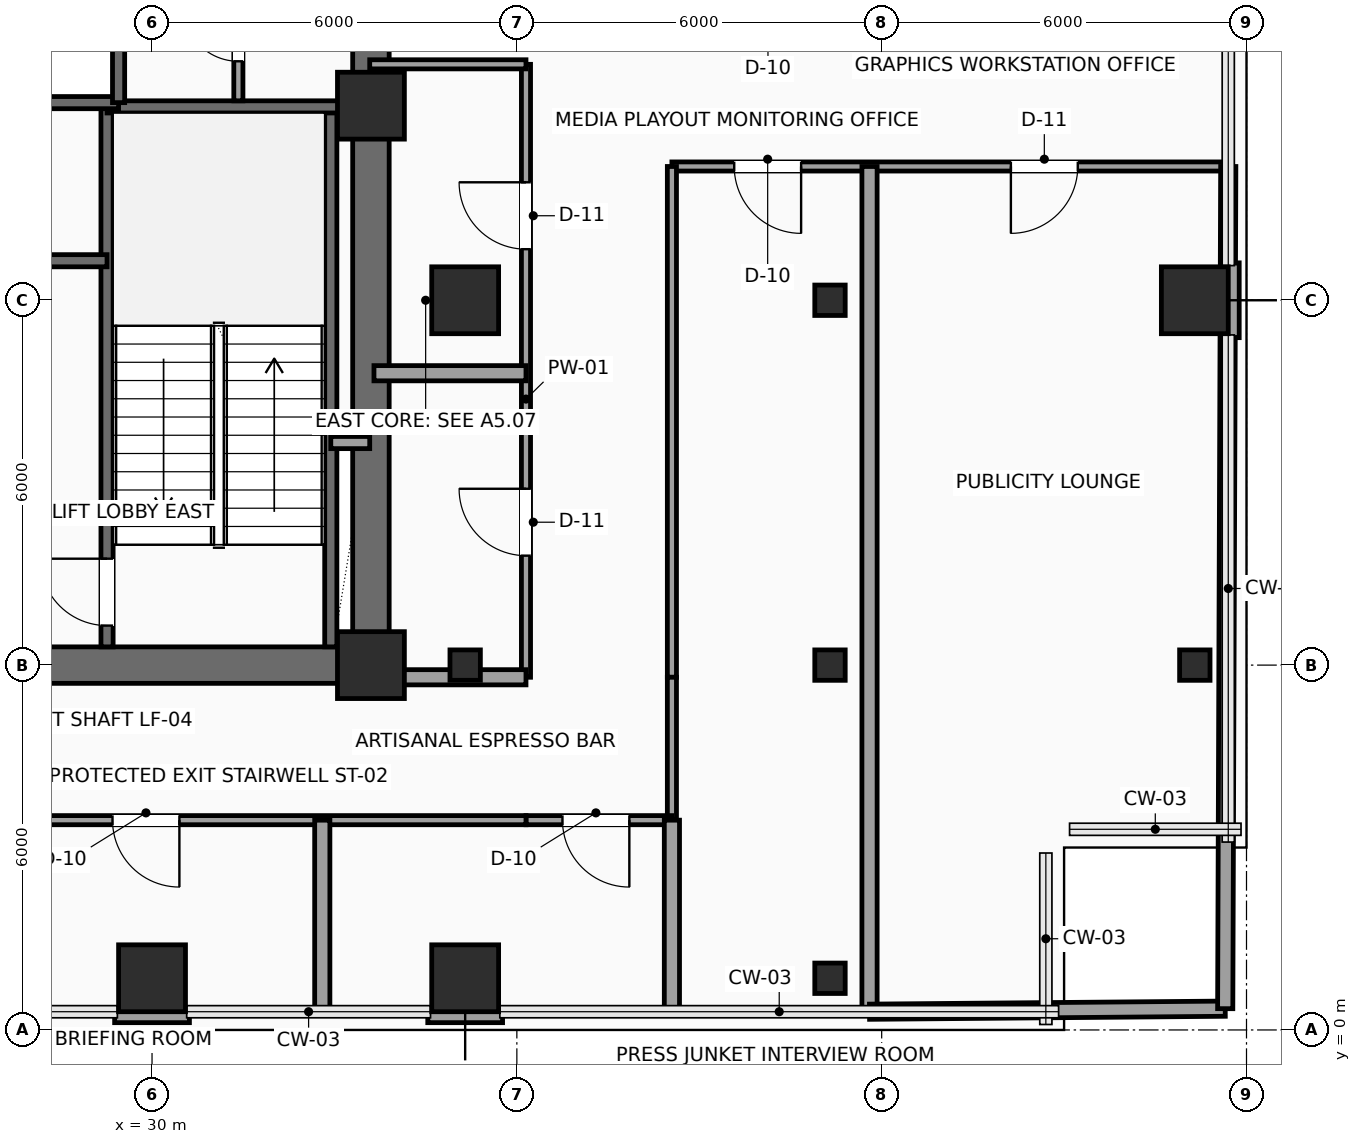
"""IFC4 building model, lengths in metres.
Left out: names, types, materials, properties, quantities, classifications, styles, units other than length and angle.
Written with IfcOpenShell. Run it as: python <this file> out.ifc"""

import sys

from ifc_helpers import new_model, si_unit, direction, frame, frame_2d, origin, origin_2d, place, context, subcontext, project, spatial, rectangle, hollow_rectangle, extrude, element, fill, save


model = new_model("IFC4")
c1 = context("Model", 3, precision=1e-05, world=origin(), true_north=direction((0.0, 1.0)))
c2 = subcontext(c1, "Body", "Model", "MODEL_VIEW")
j1 = project(units=[si_unit("LENGTHUNIT", "METRE"), si_unit("PLANEANGLEUNIT", "RADIAN")], contexts=[c1])
p1 = place(None, origin())
s1 = spatial("IfcSite", under=j1, at=p1, CompositionType="ELEMENT")
p2 = place(p1, origin())
s2 = spatial("IfcBuilding", under=s1, at=p2, CompositionType="ELEMENT")
p3 = place(p2, frame((0.0, 0.0, 130.65)))
s3 = spatial("IfcBuildingStorey", under=s2, at=p3, CompositionType="ELEMENT", Elevation=130.65)
for number, where, z_axis, x_axis in (
    (1, (33.6, 6.0, 0.0), (0.0, 0.0, 1.0), (1.0, 0.0, 0.0)),
    (2, (33.6, 15.2, 0.0), (0.0, 0.0, 1.0), (1.0, 0.0, 0.0)),
    (3, (30.0, 0.85, 0.0), (0.0, 0.0, 1.0), (1.0, 0.0, 0.0)),
    (4, (35.15, 0.85, 0.0), (0.0, 0.0, 1.0), (1.0, 0.0, 0.0)),
):
    element("IfcColumn", number, at=place(p3, frame(where, z_axis=z_axis, x_axis=x_axis)), inside=s3, PredefinedType="COLUMN", context=c2, shape_type="SweptSolid", body=[
        extrude(rectangle(XDim=1.1, YDim=1.1, at=origin_2d()), origin(), (0.0, 0.0, 1.0), 3.75),
    ])
p4 = place(p3, frame((35.15, 6.0, 0.0), z_axis=(0.0, 0.0, 1.0), x_axis=(1.0, 0.0, 0.0)))
e5 = element("IfcColumn", 5, at=p4, inside=s3, PredefinedType="COLUMN", context=c2, shape_type="SweptSolid", body=[
    extrude(hollow_rectangle(XDim=0.5, YDim=0.5, WallThickness=0.025, InnerFilletRadius=0.025, OuterFilletRadius=0.04, at=origin_2d()), origin(), (0.0, 0.0, 1.0), 3.75),
])
p5 = place(p3, frame((35.15, 12.0, 0.0), z_axis=(0.0, 0.0, 1.0), x_axis=(1.0, 0.0, 0.0)))
e6 = element("IfcColumn", 6, at=p5, inside=s3, PredefinedType="COLUMN", context=c2, shape_type="SweptSolid", body=[
    extrude(rectangle(XDim=1.1, YDim=1.1, at=origin_2d()), origin(), (0.0, 0.0, 1.0), 3.75),
])
for number, where, z_axis, x_axis in (
    (7, (41.15, 0.85, 0.0), (0.0, 0.0, 1.0), (1.0, 0.0, 0.0)),
    (8, (41.15, 6.0, 0.0), (0.0, 0.0, 1.0), (1.0, 0.0, 0.0)),
    (9, (41.15, 12.0, 0.0), (0.0, 0.0, 1.0), (1.0, 0.0, 0.0)),
    (10, (47.15, 6.0, 0.0), (0.0, 0.0, 1.0), (1.0, 0.0, 0.0)),
):
    element("IfcColumn", number, at=place(p3, frame(where, z_axis=z_axis, x_axis=x_axis)), inside=s3, PredefinedType="COLUMN", context=c2, shape_type="SweptSolid", body=[
        extrude(hollow_rectangle(XDim=0.5, YDim=0.5, WallThickness=0.025, InnerFilletRadius=0.025, OuterFilletRadius=0.04, at=origin_2d()), origin(), (0.0, 0.0, 1.0), 3.75),
    ])
p6 = place(p3, frame((47.15, 12.0, 0.0), z_axis=(0.0, 0.0, 1.0), x_axis=(1.0, 0.0, 0.0)))
e11 = element("IfcColumn", 11, at=p6, inside=s3, PredefinedType="COLUMN", context=c2, shape_type="SweptSolid", body=[
    extrude(rectangle(XDim=1.1, YDim=1.1, at=origin_2d()), origin(), (0.0, 0.0, 1.0), 3.75),
])
for number, where, z_axis, x_axis in (
    (12, (47.76, 12.615, 0.0), (0.0, 0.0, 1.0), (0.0, -1.0, 0.0)),
    (13, (35.765, 0.24, 0.0), (0.0, 0.0, 1.0), (-1.0, 0.0, 0.0)),
    (14, (30.615, 0.24, 0.0), (0.0, 0.0, 1.0), (-1.0, 0.0, 0.0)),
):
    element("IfcWall", number, at=place(p3, frame(where, z_axis=z_axis, x_axis=x_axis)), inside=s3, PredefinedType="SOLIDWALL", context=c2, shape_type="SweptSolid", body=[
        extrude(rectangle(XDim=1.23, YDim=0.24, at=frame_2d((0.615, 0.0))), origin(), (0.0, 0.0, 1.0), 3.525),
    ])
p7 = place(p3, frame((24.0, 6.0, 0.0), z_axis=(0.0, 0.0, 1.0), x_axis=(1.0, 0.0, 0.0)))
e15 = element("IfcWall", 15, at=p7, inside=s3, PredefinedType="SHEAR", context=c2, shape_type="SweptSolid", body=[
    extrude(rectangle(XDim=9.6, YDim=0.6, at=frame_2d((4.8, 0.0))), origin(), (0.0, 0.0, 1.0), 3.525),
])
p8 = place(p3, frame((33.6, 6.0, 0.0), z_axis=(0.0, 0.0, 1.0), x_axis=(0.0, 1.0, 0.0)))
e16 = element("IfcWall", 16, at=p8, inside=s3, PredefinedType="SHEAR", context=c2, shape_type="SweptSolid", body=[
    extrude(rectangle(XDim=12.0, YDim=0.6, at=frame_2d((6.0, 0.0))), origin(), (0.0, 0.0, 1.0), 3.525),
])
p9 = place(p8, frame((10.2, 0.0, 0.0)))
e17 = element("IfcOpeningElement", 17, at=p9, cuts=e16, PredefinedType="OPENING", context=c2, shape_type="SweptSolid", body=[
    extrude(rectangle(XDim=0.9, YDim=2.15, at=frame_2d((0.45, 1.075))), frame((0.0, 0.31, 0.0), z_axis=(0.0, -1.0, 0.0), x_axis=(1.0, 0.0, 0.0)), (0.0, 0.0, 1.0), 0.62),
])
p10 = place(p3, frame((29.26, 6.3, 0.0), z_axis=(0.0, 0.0, 1.0), x_axis=(0.0, 1.0, 0.0)))
e18 = element("IfcWall", 18, at=p10, inside=s3, PredefinedType="SHEAR", context=c2, shape_type="SweptSolid", body=[
    extrude(rectangle(XDim=8.88, YDim=0.2, at=frame_2d((4.44, 0.0))), origin(), (0.0, 0.0, 1.0), 3.525),
])
p11 = place(p10, frame((0.35, 0.0, 0.0)))
e19 = element("IfcOpeningElement", 19, at=p11, cuts=e18, PredefinedType="OPENING", context=c2, shape_type="SweptSolid", body=[
    extrude(rectangle(XDim=1.1, YDim=2.2, at=frame_2d((0.55, 1.1))), frame((0.0, 0.11, 0.0), z_axis=(0.0, -1.0, 0.0), x_axis=(1.0, 0.0, 0.0)), (0.0, 0.0, 1.0), 0.22),
])
p12 = place(p3, frame((32.94, 6.3, 0.0), z_axis=(0.0, 0.0, 1.0), x_axis=(0.0, 1.0, 0.0)))
e20 = element("IfcWall", 20, at=p12, inside=s3, PredefinedType="SHEAR", context=c2, shape_type="SweptSolid", body=[
    extrude(rectangle(XDim=8.88, YDim=0.2, at=frame_2d((4.44, 0.0))), origin(), (0.0, 0.0, 1.0), 3.525),
])
p13 = place(p3, frame((29.26, 15.18, 0.0), z_axis=(0.0, 0.0, 1.0), x_axis=(1.0, 0.0, 0.0)))
e21 = element("IfcWall", 21, at=p13, inside=s3, PredefinedType="SHEAR", context=c2, shape_type="SweptSolid", body=[
    extrude(rectangle(XDim=4.04, YDim=0.2, at=frame_2d((2.02, 0.0))), origin(), (0.0, 0.0, 1.0), 3.525),
])
p14 = place(p3, frame((26.42, 12.65, 0.0), z_axis=(0.0, 0.0, 1.0), x_axis=(1.0, 0.0, 0.0)))
e22 = element("IfcWall", 22, at=p14, inside=s3, PredefinedType="SHEAR", context=c2, shape_type="SweptSolid", body=[
    extrude(rectangle(XDim=2.84, YDim=0.2, at=frame_2d((1.42, 0.0))), origin(), (0.0, 0.0, 1.0), 3.525),
])
p15 = place(p14, frame((0.9, 0.0, 0.0)))
e23 = element("IfcOpeningElement", 23, at=p15, cuts=e22, PredefinedType="OPENING", context=c2, shape_type="SweptSolid", body=[
    extrude(rectangle(XDim=0.9, YDim=2.15, at=frame_2d((0.45, 1.075))), frame((0.0, 0.11, 0.0), z_axis=(0.0, -1.0, 0.0), x_axis=(1.0, 0.0, 0.0)), (0.0, 0.0, 1.0), 0.22),
])
p16 = place(p3, frame((32.94, 9.66, 0.0), z_axis=(0.0, 0.0, 1.0), x_axis=(1.0, 0.0, 0.0)))
e24 = element("IfcWall", 24, at=p16, inside=s3, PredefinedType="SOLIDWALL", context=c2, shape_type="SweptSolid", body=[
    extrude(rectangle(XDim=0.64, YDim=0.2, at=frame_2d((0.32, 0.0))), origin(), (0.0, 0.0, 1.0), 3.525),
])
p17 = place(p3, frame((24.25, 15.25, 0.0), z_axis=(0.0, 0.0, 1.0), x_axis=(1.0, 0.0, 0.0)))
e25 = element("IfcWall", 25, at=p17, inside=s3, PredefinedType="SHEAR", context=c2, shape_type="SweptSolid", body=[
    extrude(rectangle(XDim=5.2, YDim=0.2, at=frame_2d((2.6, 0.0))), origin(), (0.0, 0.0, 1.0), 3.525),
])
p18 = place(p3, frame((29.45, 15.25, 0.0), z_axis=(0.0, 0.0, 1.0), x_axis=(0.0, 1.0, 0.0)))
e26 = element("IfcWall", 26, at=p18, inside=s3, PredefinedType="SHEAR", context=c2, shape_type="SweptSolid", body=[
    extrude(rectangle(XDim=2.45, YDim=0.2, at=frame_2d((1.225, 0.0))), origin(), (0.0, 0.0, 1.0), 3.525),
])
p19 = place(p3, frame((31.42, 15.28, 0.0), z_axis=(0.0, 0.0, 1.0), x_axis=(0.0, 1.0, 0.0)))
e27 = element("IfcWall", 27, at=p19, inside=s3, PredefinedType="PARTITIONING", context=c2, shape_type="SweptSolid", body=[
    extrude(rectangle(XDim=2.42, YDim=0.15, at=frame_2d((1.21, 0.0))), origin(), (0.0, 0.0, 1.0), 3.525),
])
p20 = place(p19, frame((0.65, 0.0, 0.0)))
e28 = element("IfcOpeningElement", 28, at=p20, cuts=e27, PredefinedType="OPENING", context=c2, shape_type="SweptSolid", body=[
    extrude(rectangle(XDim=0.9, YDim=2.15, at=frame_2d((0.45, 1.075))), frame((0.0, 0.085, 0.0), z_axis=(0.0, -1.0, 0.0), x_axis=(1.0, 0.0, 0.0)), (0.0, 0.0, 1.0), 0.17),
])
p21 = place(p3, frame((36.15, 5.8, 0.0), z_axis=(0.0, 0.0, 1.0), x_axis=(0.0, 1.0, 0.0)))
e29 = element("IfcWall", 29, at=p21, inside=s3, PredefinedType="PARTITIONING", context=c2, shape_type="SweptSolid", body=[
    extrude(rectangle(XDim=10.08, YDim=0.15, at=frame_2d((5.04, 0.0))), origin(), (0.0, 0.0, 1.0), 3.525),
])
p22 = place(p21, frame((2.0, 0.0, 0.0)))
e30 = element("IfcOpeningElement", 30, at=p22, cuts=e29, PredefinedType="OPENING", context=c2, shape_type="SweptSolid", body=[
    extrude(rectangle(XDim=1.1, YDim=2.25, at=frame_2d((0.55, 1.125))), frame((0.0, 0.085, 0.0), z_axis=(0.0, -1.0, 0.0), x_axis=(1.0, 0.0, 0.0)), (0.0, 0.0, 1.0), 0.17),
])
p23 = place(p21, frame((7.04, 0.0, 0.0)))
e31 = element("IfcOpeningElement", 31, at=p23, cuts=e29, PredefinedType="OPENING", context=c2, shape_type="SweptSolid", body=[
    extrude(rectangle(XDim=1.1, YDim=2.25, at=frame_2d((0.55, 1.125))), frame((0.0, 0.085, 0.0), z_axis=(0.0, -1.0, 0.0), x_axis=(1.0, 0.0, 0.0)), (0.0, 0.0, 1.0), 0.17),
])
p24 = place(p3, frame((36.15, 15.88, 0.0), z_axis=(0.0, 0.0, 1.0), x_axis=(-1.0, 0.0, 0.0)))
e32 = element("IfcWall", 32, at=p24, inside=s3, PredefinedType="PARTITIONING", context=c2, shape_type="SweptSolid", body=[
    extrude(rectangle(XDim=2.57, YDim=0.15, at=frame_2d((1.285, 0.0))), origin(), (0.0, 0.0, 1.0), 3.525),
])
p25 = place(p3, frame((47.7, 14.2, 0.0), z_axis=(0.0, 0.0, 1.0), x_axis=(-1.0, 0.0, 0.0)))
e33 = element("IfcWall", 33, at=p25, inside=s3, PredefinedType="PARTITIONING", context=c2, shape_type="SweptSolid", body=[
    extrude(rectangle(XDim=9.15, YDim=0.15, at=frame_2d((4.575, 0.0))), origin(), (0.0, 0.0, 1.0), 3.525),
])
p26 = place(p25, frame((7.025, 0.0, 0.0)))
e34 = element("IfcOpeningElement", 34, at=p26, cuts=e33, PredefinedType="OPENING", context=c2, shape_type="SweptSolid", body=[
    extrude(rectangle(XDim=1.1, YDim=2.25, at=frame_2d((0.55, 1.125))), frame((0.0, 0.085, 0.0), z_axis=(0.0, -1.0, 0.0), x_axis=(1.0, 0.0, 0.0)), (0.0, 0.0, 1.0), 0.17),
])
p27 = place(p25, frame((2.475, 0.0, 0.0)))
e35 = element("IfcOpeningElement", 35, at=p27, cuts=e33, PredefinedType="OPENING", context=c2, shape_type="SweptSolid", body=[
    extrude(rectangle(XDim=1.1, YDim=2.25, at=frame_2d((0.55, 1.125))), frame((0.0, 0.085, 0.0), z_axis=(0.0, -1.0, 0.0), x_axis=(1.0, 0.0, 0.0)), (0.0, 0.0, 1.0), 0.17),
])
p28 = place(p3, frame((38.55, 14.2, 0.0), z_axis=(0.0, 0.0, 1.0), x_axis=(0.0, -1.0, 0.0)))
e36 = element("IfcWall", 36, at=p28, inside=s3, PredefinedType="PARTITIONING", context=c2, shape_type="SweptSolid", body=[
    extrude(rectangle(XDim=8.4, YDim=0.15, at=frame_2d((4.2, 0.0))), origin(), (0.0, 0.0, 1.0), 3.525),
])
p29 = place(p3, frame((38.55, 5.8, 0.0), z_axis=(0.0, 0.0, 1.0), x_axis=(0.0, -1.0, 0.0)))
e37 = element("IfcWall", 37, at=p29, inside=s3, PredefinedType="PARTITIONING", context=c2, shape_type="SweptSolid", body=[
    extrude(rectangle(XDim=2.35, YDim=0.15, at=frame_2d((1.175, 0.0))), origin(), (0.0, 0.0, 1.0), 3.525),
])
p30 = place(p3, frame((38.55, 3.45, 0.0), z_axis=(0.0, 0.0, 1.0), x_axis=(-1.0, 0.0, 0.0)))
e38 = element("IfcWall", 38, at=p30, inside=s3, PredefinedType="PARTITIONING", context=c2, shape_type="SweptSolid", body=[
    extrude(rectangle(XDim=2.4, YDim=0.15, at=frame_2d((1.2, 0.0))), origin(), (0.0, 0.0, 1.0), 3.067),
])
p31 = place(p30, frame((0.7, 0.0, 0.0)))
e39 = element("IfcOpeningElement", 39, at=p31, cuts=e38, PredefinedType="OPENING", context=c2, shape_type="SweptSolid", body=[
    extrude(rectangle(XDim=1.1, YDim=2.25, at=frame_2d((0.55, 1.125))), frame((0.0, 0.085, 0.0), z_axis=(0.0, -1.0, 0.0), x_axis=(1.0, 0.0, 0.0)), (0.0, 0.0, 1.0), 0.17),
])
p32 = place(p3, frame((36.15, 3.45, 0.0), z_axis=(0.0, 0.0, 1.0), x_axis=(-1.0, 0.0, 0.0)))
e40 = element("IfcWall", 40, at=p32, inside=s3, PredefinedType="PARTITIONING", context=c2, shape_type="SweptSolid", body=[
    extrude(rectangle(XDim=12.2, YDim=0.15, at=frame_2d((6.1, 0.0))), origin(), (0.0, 0.0, 1.0), 3.067),
])
p33 = place(p32, frame((10.125, 0.0, 0.0)))
e41 = element("IfcOpeningElement", 41, at=p33, cuts=e40, PredefinedType="OPENING", context=c2, shape_type="SweptSolid", body=[
    extrude(rectangle(XDim=1.1, YDim=2.25, at=frame_2d((0.55, 1.125))), frame((0.0, 0.085, 0.0), z_axis=(0.0, -1.0, 0.0), x_axis=(1.0, 0.0, 0.0)), (0.0, 0.0, 1.0), 0.17),
])
p34 = place(p32, frame((5.7, 0.0, 0.0)))
e42 = element("IfcOpeningElement", 42, at=p34, cuts=e40, PredefinedType="OPENING", context=c2, shape_type="SweptSolid", body=[
    extrude(rectangle(XDim=1.1, YDim=2.25, at=frame_2d((0.55, 1.125))), frame((0.0, 0.085, 0.0), z_axis=(0.0, -1.0, 0.0), x_axis=(1.0, 0.0, 0.0)), (0.0, 0.0, 1.0), 0.17),
])
for number, where, z_axis, x_axis in (
    (43, (32.8, 0.3, 0.0), (0.0, 0.0, 1.0), (0.0, 1.0, 0.0)),
    (44, (38.55, 0.3, 0.0), (0.0, 0.0, 1.0), (0.0, 1.0, 0.0)),
):
    element("IfcWall", number, at=place(p3, frame(where, z_axis=z_axis, x_axis=x_axis)), inside=s3, PredefinedType="PARTITIONING", context=c2, shape_type="SweptSolid", body=[
        extrude(rectangle(XDim=3.15, YDim=0.25, at=frame_2d((1.575, 0.0))), origin(), (0.0, 0.0, 1.0), 3.525),
    ])
p35 = place(p3, frame((33.65, 5.8, 0.0), z_axis=(0.0, 0.0, 1.0), x_axis=(1.0, 0.0, 0.0)))
e45 = element("IfcWall", 45, at=p35, inside=s3, PredefinedType="PARTITIONING", context=c2, shape_type="SweptSolid", body=[
    extrude(rectangle(XDim=2.5, YDim=0.25, at=frame_2d((1.25, 0.0))), origin(), (0.0, 0.0, 1.0), 3.017),
])
p36 = place(p3, frame((33.65, 10.8, 0.0), z_axis=(0.0, 0.0, 1.0), x_axis=(1.0, 0.0, 0.0)))
e46 = element("IfcWall", 46, at=p36, inside=s3, PredefinedType="PARTITIONING", context=c2, shape_type="SweptSolid", body=[
    extrude(rectangle(XDim=2.5, YDim=0.25, at=frame_2d((1.25, 0.0))), origin(), (0.0, 0.0, 1.0), 3.525),
])
p37 = place(p3, frame((41.8, 0.3, 0.0), z_axis=(0.0, 0.0, 1.0), x_axis=(0.0, 1.0, 0.0)))
e47 = element("IfcWall", 47, at=p37, inside=s3, PredefinedType="PARTITIONING", context=c2, shape_type="SweptSolid", body=[
    extrude(rectangle(XDim=13.9, YDim=0.25, at=frame_2d((6.95, 0.0))), origin(), (0.0, 0.0, 1.0), 3.525),
])
p38 = place(p3, frame((41.8, 0.3, 0.0), z_axis=(0.0, 0.0, 1.0), x_axis=(0.999963403125, 0.00855525636, 0.0)))
e48 = element("IfcWall", 48, at=p38, inside=s3, PredefinedType="PARTITIONING", context=c2, shape_type="SweptSolid", body=[
    extrude(rectangle(XDim=5.85, YDim=0.25, at=frame_2d((2.925, 0.0))), origin(), (0.0, 0.0, 1.0), 3.525),
])
p39 = place(p3, frame((47.65, 0.35, 0.0), z_axis=(0.0, 0.0, 1.0), x_axis=(0.003606251025, 0.999993497456, 0.0)))
e49 = element("IfcWall", 49, at=p39, inside=s3, PredefinedType="PARTITIONING", context=c2, shape_type="SweptSolid", body=[
    extrude(rectangle(XDim=11.035, YDim=0.25, at=frame_2d((5.518, 0.0))), origin(), (0.0, 0.0, 1.0), 3.525),
])
p40 = place(p3, frame((47.694, 12.615, 0.0), z_axis=(0.0, 0.0, 1.0), x_axis=(0.003542799701, 0.999993724265, 0.0)))
e50 = element("IfcWall", 50, at=p40, inside=s3, PredefinedType="PARTITIONING", context=c2, shape_type="SweptSolid", body=[
    extrude(rectangle(XDim=1.585, YDim=0.25, at=frame_2d((0.792, 0.0))), origin(), (0.0, 0.0, 1.0), 3.525),
])
p41 = place(p11, origin())
e51 = element("IfcDoor", 51, at=p41, inside=s3, OperationType="SINGLE_SWING_RIGHT", PredefinedType="DOOR", context=c2, shape_type="SweptSolid", body=[
    extrude(rectangle(XDim=1.1, YDim=2.2, at=frame_2d((0.55, 1.1))), frame((0.0, 0.025, 0.0), z_axis=(0.0, -1.0, 0.0), x_axis=(1.0, 0.0, 0.0)), (0.0, 0.0, 1.0), 0.05),
])
fill(e19, e51)
p42 = place(p20, origin())
e52 = element("IfcDoor", 52, at=p42, inside=s3, OperationType="SINGLE_SWING_RIGHT", PredefinedType="DOOR", context=c2, shape_type="SweptSolid", body=[
    extrude(rectangle(XDim=0.9, YDim=2.15, at=frame_2d((0.45, 1.075))), frame((0.0, 0.025, 0.0), z_axis=(0.0, -1.0, 0.0), x_axis=(1.0, 0.0, 0.0)), (0.0, 0.0, 1.0), 0.05),
])
fill(e28, e52)
p43 = place(p22, origin())
e53 = element("IfcDoor", 53, at=p43, inside=s3, OperationType="SINGLE_SWING_RIGHT", PredefinedType="DOOR", context=c2, shape_type="SweptSolid", body=[
    extrude(rectangle(XDim=1.1, YDim=2.25, at=frame_2d((0.55, 1.125))), frame((0.0, 0.025, 0.0), z_axis=(0.0, -1.0, 0.0), x_axis=(1.0, 0.0, 0.0)), (0.0, 0.0, 1.0), 0.05),
])
fill(e30, e53)
p44 = place(p23, origin())
e54 = element("IfcDoor", 54, at=p44, inside=s3, OperationType="SINGLE_SWING_RIGHT", PredefinedType="DOOR", context=c2, shape_type="SweptSolid", body=[
    extrude(rectangle(XDim=1.1, YDim=2.25, at=frame_2d((0.55, 1.125))), frame((0.0, 0.025, 0.0), z_axis=(0.0, -1.0, 0.0), x_axis=(1.0, 0.0, 0.0)), (0.0, 0.0, 1.0), 0.05),
])
fill(e31, e54)
p45 = place(p26, origin())
e55 = element("IfcDoor", 55, at=p45, inside=s3, OperationType="SINGLE_SWING_LEFT", PredefinedType="DOOR", context=c2, shape_type="SweptSolid", body=[
    extrude(rectangle(XDim=1.1, YDim=2.25, at=frame_2d((0.55, 1.125))), frame((0.0, 0.025, 0.0), z_axis=(0.0, -1.0, 0.0), x_axis=(1.0, 0.0, 0.0)), (0.0, 0.0, 1.0), 0.05),
])
fill(e34, e55)
p46 = place(p27, origin())
e56 = element("IfcDoor", 56, at=p46, inside=s3, OperationType="SINGLE_SWING_RIGHT", PredefinedType="DOOR", context=c2, shape_type="SweptSolid", body=[
    extrude(rectangle(XDim=1.1, YDim=2.25, at=frame_2d((0.55, 1.125))), frame((0.0, 0.025, 0.0), z_axis=(0.0, -1.0, 0.0), x_axis=(1.0, 0.0, 0.0)), (0.0, 0.0, 1.0), 0.05),
])
fill(e35, e56)
p47 = place(p31, origin())
e57 = element("IfcDoor", 57, at=p47, inside=s3, OperationType="SINGLE_SWING_LEFT", PredefinedType="DOOR", context=c2, shape_type="SweptSolid", body=[
    extrude(rectangle(XDim=1.1, YDim=2.25, at=frame_2d((0.55, 1.125))), frame((0.0, 0.025, 0.0), z_axis=(0.0, -1.0, 0.0), x_axis=(1.0, 0.0, 0.0)), (0.0, 0.0, 1.0), 0.05),
])
fill(e39, e57)
p48 = place(p34, origin())
e58 = element("IfcDoor", 58, at=p48, inside=s3, OperationType="SINGLE_SWING_LEFT", PredefinedType="DOOR", context=c2, shape_type="SweptSolid", body=[
    extrude(rectangle(XDim=1.1, YDim=2.25, at=frame_2d((0.55, 1.125))), frame((0.0, 0.025, 0.0), z_axis=(0.0, -1.0, 0.0), x_axis=(1.0, 0.0, 0.0)), (0.0, 0.0, 1.0), 0.05),
])
fill(e42, e58)
save(model, sys.argv[1])
